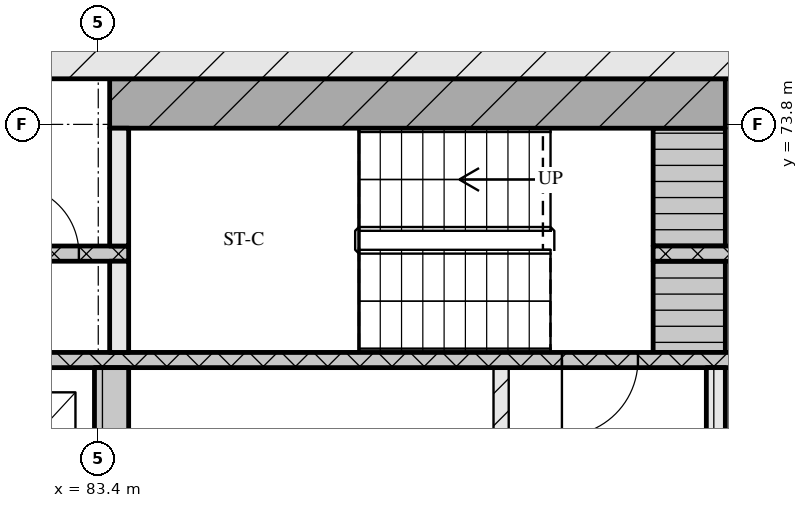
"""IFC4 building model, lengths in metres.
Left out: names, types, materials, properties, quantities, classifications, styles, units other than length and angle.
Written with IfcOpenShell. Run it as: python <this file> out.ifc"""

import sys

from ifc_helpers import new_model, si_unit, direction, frame, frame_2d, origin, place, context, subcontext, project, spatial, rectangle, extrude, element, fill, save


model = new_model("IFC4")
c1 = context("Model", 3, precision=1e-05, world=origin(), true_north=direction((0.0, 1.0)))
c2 = subcontext(c1, "Body", "Model", "MODEL_VIEW")
j1 = project(units=[si_unit("LENGTHUNIT", "METRE"), si_unit("PLANEANGLEUNIT", "RADIAN")], contexts=[c1])
p1 = place(None, origin())
s1 = spatial("IfcSite", under=j1, at=p1, CompositionType="ELEMENT")
p2 = place(p1, origin())
s2 = spatial("IfcBuilding", under=s1, at=p2, CompositionType="ELEMENT")
p3 = place(p2, frame((0.0, 0.0, 48.0)))
s3 = spatial("IfcBuildingStorey", under=s2, at=p3, CompositionType="ELEMENT", Elevation=48.0)
p4 = place(p3, frame((66.6, 75.0, 0.0), z_axis=(0.0, 0.0, 1.0), x_axis=(1.0, 0.0, 0.0)))
e1 = element("IfcWall", 1, at=p4, inside=s3, PredefinedType="SOLIDWALL", context=c2, shape_type="SweptSolid", body=[
    extrude(rectangle(XDim=42.0, YDim=1.2, at=frame_2d((21.0, 0.0))), origin(), (0.0, 0.0, 1.0), 3.32),
])
p5 = place(p3, frame((83.575, 68.0, 0.0), z_axis=(0.0, 0.0, 1.0), x_axis=(0.0, 1.0, 0.0)))
e2 = element("IfcWall", 2, at=p5, inside=s3, PredefinedType="SOLIDWALL", context=c2, shape_type="SweptSolid", body=[
    extrude(rectangle(XDim=2.6, YDim=0.45, at=frame_2d((1.3, 0.0))), origin(), (0.0, 0.0, 1.0), 3.32),
])
p6 = place(p3, frame((88.7, 68.0, 0.0), z_axis=(0.0, 0.0, 1.0), x_axis=(0.0, 1.0, 0.0)))
e3 = element("IfcWall", 3, at=p6, inside=s3, PredefinedType="PARTITIONING", context=c2, shape_type="SweptSolid", body=[
    extrude(rectangle(XDim=2.6, YDim=0.2, at=frame_2d((1.3, 0.0))), origin(), (0.0, 0.0, 1.0), 3.32),
])
p7 = place(p3, frame((91.525, 68.0, 0.0), z_axis=(0.0, 0.0, 1.0), x_axis=(0.0, 1.0, 0.0)))
e4 = element("IfcWall", 4, at=p7, inside=s3, PredefinedType="SOLIDWALL", context=c2, shape_type="SweptSolid", body=[
    extrude(rectangle(XDim=2.6, YDim=0.25, at=frame_2d((1.3, 0.0))), origin(), (0.0, 0.0, 1.0), 3.32),
])
p8 = place(p3, frame((67.8, 70.7, 0.0), z_axis=(0.0, 0.0, 1.0), x_axis=(1.0, 0.0, 0.0)))
e5 = element("IfcWall", 5, at=p8, inside=s3, PredefinedType="SOLIDWALL", context=c2, shape_type="SweptSolid", body=[
    extrude(rectangle(XDim=39.6, YDim=0.2, at=frame_2d((19.8, 0.0))), origin(), (0.0, 0.0, 1.0), 3.32),
])
p9 = place(p8, frame((0.65, 0.0, 0.0)))
e6 = element("IfcOpeningElement", 6, at=p9, cuts=e5, PredefinedType="OPENING", context=c2, shape_type="SweptSolid", body=[
    extrude(rectangle(XDim=1.1, YDim=2.1, at=frame_2d((0.55, 1.05))), frame((0.0, 0.11, 0.0), z_axis=(0.0, -1.0, 0.0), x_axis=(1.0, 0.0, 0.0)), (0.0, 0.0, 1.0), 0.22),
])
p10 = place(p8, frame((3.25, 0.0, 0.0)))
e7 = element("IfcOpeningElement", 7, at=p10, cuts=e5, PredefinedType="OPENING", context=c2, shape_type="SweptSolid", body=[
    extrude(rectangle(XDim=1.1, YDim=2.1, at=frame_2d((0.55, 1.05))), frame((0.0, 0.11, 0.0), z_axis=(0.0, -1.0, 0.0), x_axis=(1.0, 0.0, 0.0)), (0.0, 0.0, 1.0), 0.22),
])
p11 = place(p8, frame((5.9, 0.0, 0.0)))
e8 = element("IfcOpeningElement", 8, at=p11, cuts=e5, PredefinedType="OPENING", context=c2, shape_type="SweptSolid", body=[
    extrude(rectangle(XDim=1.0, YDim=2.1, at=frame_2d((0.5, 1.05))), frame((0.0, 0.11, 0.0), z_axis=(0.0, -1.0, 0.0), x_axis=(1.0, 0.0, 0.0)), (0.0, 0.0, 1.0), 0.22),
])
p12 = place(p8, frame((21.7, 0.0, 0.0)))
e9 = element("IfcOpeningElement", 9, at=p12, cuts=e5, PredefinedType="OPENING", context=c2, shape_type="SweptSolid", body=[
    extrude(rectangle(XDim=1.0, YDim=2.1, at=frame_2d((0.5, 1.05))), frame((0.0, 0.11, 0.0), z_axis=(0.0, -1.0, 0.0), x_axis=(1.0, 0.0, 0.0)), (0.0, 0.0, 1.0), 0.22),
])
p13 = place(p8, frame((32.7, 0.0, 0.0)))
e10 = element("IfcOpeningElement", 10, at=p13, cuts=e5, PredefinedType="OPENING", context=c2, shape_type="SweptSolid", body=[
    extrude(rectangle(XDim=1.0, YDim=2.1, at=frame_2d((0.5, 1.05))), frame((0.0, 0.11, 0.0), z_axis=(0.0, -1.0, 0.0), x_axis=(1.0, 0.0, 0.0)), (0.0, 0.0, 1.0), 0.22),
])
p14 = place(p8, frame((35.25, 0.0, 0.0)))
e11 = element("IfcOpeningElement", 11, at=p14, cuts=e5, PredefinedType="OPENING", context=c2, shape_type="SweptSolid", body=[
    extrude(rectangle(XDim=1.1, YDim=2.1, at=frame_2d((0.55, 1.05))), frame((0.0, 0.11, 0.0), z_axis=(0.0, -1.0, 0.0), x_axis=(1.0, 0.0, 0.0)), (0.0, 0.0, 1.0), 0.22),
])
p15 = place(p8, frame((37.85, 0.0, 0.0)))
e12 = element("IfcOpeningElement", 12, at=p15, cuts=e5, PredefinedType="OPENING", context=c2, shape_type="SweptSolid", body=[
    extrude(rectangle(XDim=1.1, YDim=2.1, at=frame_2d((0.55, 1.05))), frame((0.0, 0.11, 0.0), z_axis=(0.0, -1.0, 0.0), x_axis=(1.0, 0.0, 0.0)), (0.0, 0.0, 1.0), 0.22),
])
p16 = place(p3, frame((83.675, 70.8, 0.0), z_axis=(0.0, 0.0, 1.0), x_axis=(0.0, 1.0, 0.0)))
e13 = element("IfcWall", 13, at=p16, inside=s3, PredefinedType="SOLIDWALL", context=c2, shape_type="SweptSolid", body=[
    extrude(rectangle(XDim=1.2, YDim=0.25, at=frame_2d((0.6, 0.0))), origin(), (0.0, 0.0, 1.0), 3.32),
])
p17 = place(p3, frame((91.175, 70.8, 0.0), z_axis=(0.0, 0.0, 1.0), x_axis=(0.0, 1.0, 0.0)))
e14 = element("IfcWall", 14, at=p17, inside=s3, PredefinedType="SOLIDWALL", context=c2, shape_type="SweptSolid", body=[
    extrude(rectangle(XDim=1.2, YDim=0.95, at=frame_2d((0.6, 0.0))), origin(), (0.0, 0.0, 1.0), 3.32),
])
p18 = place(p3, frame((72.8, 72.1, 0.0), z_axis=(0.0, 0.0, 1.0), x_axis=(1.0, 0.0, 0.0)))
e15 = element("IfcWall", 15, at=p18, inside=s3, PredefinedType="SOLIDWALL", context=c2, shape_type="SweptSolid", body=[
    extrude(rectangle(XDim=11.0, YDim=0.2, at=frame_2d((5.5, 0.0))), origin(), (0.0, 0.0, 1.0), 3.32),
])
p19 = place(p18, frame((1.25, 0.0, 0.0)))
e16 = element("IfcOpeningElement", 16, at=p19, cuts=e15, PredefinedType="OPENING", context=c2, shape_type="SweptSolid", body=[
    extrude(rectangle(XDim=0.9, YDim=2.1, at=frame_2d((0.45, 1.05))), frame((0.0, 0.11, 0.0), z_axis=(0.0, -1.0, 0.0), x_axis=(1.0, 0.0, 0.0)), (0.0, 0.0, 1.0), 0.22),
])
p20 = place(p18, frame((4.65, 0.0, 0.0)))
e17 = element("IfcOpeningElement", 17, at=p20, cuts=e15, PredefinedType="OPENING", context=c2, shape_type="SweptSolid", body=[
    extrude(rectangle(XDim=0.9, YDim=2.1, at=frame_2d((0.45, 1.05))), frame((0.0, 0.11, 0.0), z_axis=(0.0, -1.0, 0.0), x_axis=(1.0, 0.0, 0.0)), (0.0, 0.0, 1.0), 0.22),
])
p21 = place(p18, frame((7.47, 0.0, 0.0)))
e18 = element("IfcOpeningElement", 18, at=p21, cuts=e15, PredefinedType="OPENING", context=c2, shape_type="SweptSolid", body=[
    extrude(rectangle(XDim=0.9, YDim=2.1, at=frame_2d((0.45, 1.05))), frame((0.0, 0.11, 0.0), z_axis=(0.0, -1.0, 0.0), x_axis=(1.0, 0.0, 0.0)), (0.0, 0.0, 1.0), 0.22),
])
p22 = place(p18, frame((9.445, 0.0, 0.0)))
e19 = element("IfcOpeningElement", 19, at=p22, cuts=e15, PredefinedType="OPENING", context=c2, shape_type="SweptSolid", body=[
    extrude(rectangle(XDim=0.9, YDim=2.1, at=frame_2d((0.45, 1.05))), frame((0.0, 0.11, 0.0), z_axis=(0.0, -1.0, 0.0), x_axis=(1.0, 0.0, 0.0)), (0.0, 0.0, 1.0), 0.22),
])
p23 = place(p3, frame((90.7, 72.1, 0.0), z_axis=(0.0, 0.0, 1.0), x_axis=(1.0, 0.0, 0.0)))
e20 = element("IfcWall", 20, at=p23, inside=s3, PredefinedType="SOLIDWALL", context=c2, shape_type="SweptSolid", body=[
    extrude(rectangle(XDim=11.7, YDim=0.2, at=frame_2d((5.85, 0.0))), origin(), (0.0, 0.0, 1.0), 3.32),
])
p24 = place(p23, frame((1.6, 0.0, 0.0)))
e21 = element("IfcOpeningElement", 21, at=p24, cuts=e20, PredefinedType="OPENING", context=c2, shape_type="SweptSolid", body=[
    extrude(rectangle(XDim=0.9, YDim=2.1, at=frame_2d((0.45, 1.05))), frame((0.0, 0.11, 0.0), z_axis=(0.0, -1.0, 0.0), x_axis=(1.0, 0.0, 0.0)), (0.0, 0.0, 1.0), 0.22),
])
p25 = place(p23, frame((5.335, 0.0, 0.0)))
e22 = element("IfcOpeningElement", 22, at=p25, cuts=e20, PredefinedType="OPENING", context=c2, shape_type="SweptSolid", body=[
    extrude(rectangle(XDim=0.9, YDim=2.1, at=frame_2d((0.45, 1.05))), frame((0.0, 0.11, 0.0), z_axis=(0.0, -1.0, 0.0), x_axis=(1.0, 0.0, 0.0)), (0.0, 0.0, 1.0), 0.22),
])
p26 = place(p23, frame((9.55, 0.0, 0.0)))
e23 = element("IfcOpeningElement", 23, at=p26, cuts=e20, PredefinedType="OPENING", context=c2, shape_type="SweptSolid", body=[
    extrude(rectangle(XDim=0.9, YDim=2.1, at=frame_2d((0.45, 1.05))), frame((0.0, 0.11, 0.0), z_axis=(0.0, -1.0, 0.0), x_axis=(1.0, 0.0, 0.0)), (0.0, 0.0, 1.0), 0.22),
])
p27 = place(p3, frame((83.675, 72.2, 0.0), z_axis=(0.0, 0.0, 1.0), x_axis=(0.0, 1.0, 0.0)))
e24 = element("IfcWall", 24, at=p27, inside=s3, PredefinedType="SOLIDWALL", context=c2, shape_type="SweptSolid", body=[
    extrude(rectangle(XDim=1.55, YDim=0.25, at=frame_2d((0.775, 0.0))), origin(), (0.0, 0.0, 1.0), 3.32),
])
p28 = place(p3, frame((91.175, 72.2, 0.0), z_axis=(0.0, 0.0, 1.0), x_axis=(0.0, 1.0, 0.0)))
e25 = element("IfcWall", 25, at=p28, inside=s3, PredefinedType="SOLIDWALL", context=c2, shape_type="SweptSolid", body=[
    extrude(rectangle(XDim=1.55, YDim=0.95, at=frame_2d((0.775, 0.0))), origin(), (0.0, 0.0, 1.0), 3.32),
])
p29 = place(p3, frame((83.55, 74.075, 0.0), z_axis=(0.0, 0.0, 1.0), x_axis=(1.0, 0.0, 0.0)))
e26 = element("IfcWall", 26, at=p29, inside=s3, PredefinedType="SOLIDWALL", context=c2, shape_type="SweptSolid", body=[
    extrude(rectangle(XDim=8.1, YDim=0.65, at=frame_2d((4.05, 0.0))), origin(), (0.0, 0.0, 1.0), 3.32),
])
p30 = place(p12, origin())
e27 = element("IfcDoor", 27, at=p30, inside=s3, OperationType="SINGLE_SWING_RIGHT", PredefinedType="DOOR", context=c2, shape_type="SweptSolid", body=[
    extrude(rectangle(XDim=1.0, YDim=2.1, at=frame_2d((0.5, 1.05))), frame((0.0, 0.025, 0.0), z_axis=(0.0, -1.0, 0.0), x_axis=(1.0, 0.0, 0.0)), (0.0, 0.0, 1.0), 0.05),
])
fill(e9, e27)
p31 = place(p22, origin())
e28 = element("IfcDoor", 28, at=p31, inside=s3, OperationType="SINGLE_SWING_LEFT", PredefinedType="DOOR", context=c2, shape_type="SweptSolid", body=[
    extrude(rectangle(XDim=0.9, YDim=2.1, at=frame_2d((0.45, 1.05))), frame((0.0, 0.025, 0.0), z_axis=(0.0, -1.0, 0.0), x_axis=(1.0, 0.0, 0.0)), (0.0, 0.0, 1.0), 0.05),
])
fill(e19, e28)
save(model, sys.argv[1])
